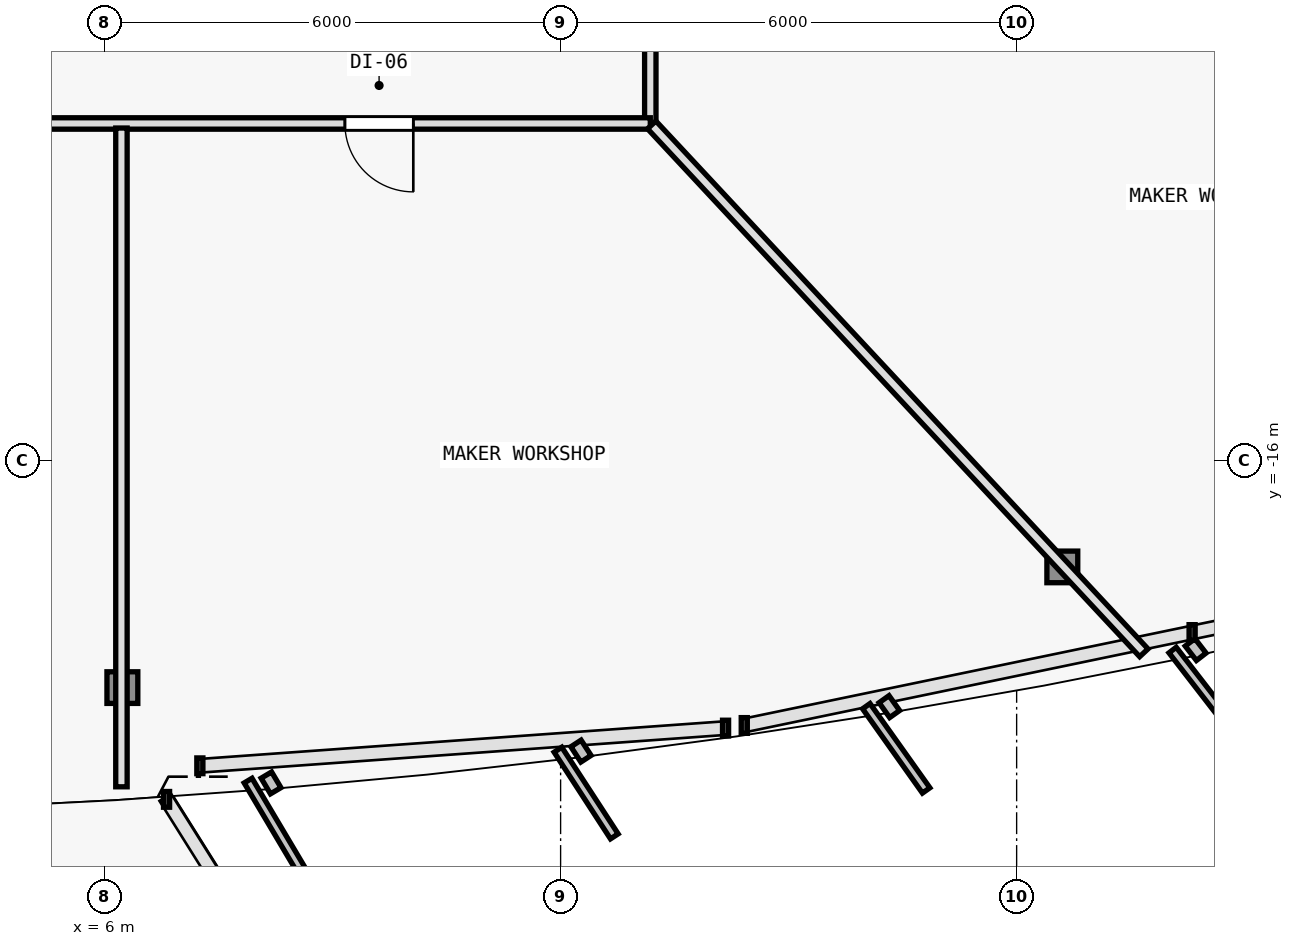
"""IFC4 building model, lengths in metres.
Left out: names, types, materials, properties, quantities, classifications, styles, units other than length and angle.
Written with IfcOpenShell. Run it as: python <this file> out.ifc"""

import sys

from ifc_helpers import new_model, si_unit, direction, frame, frame_2d, origin, origin_2d, place, context, subcontext, project, spatial, rectangle, i_section, extrude, element, fill, save


model = new_model("IFC4")
c1 = context("Model", 3, precision=1e-05, world=origin(), true_north=direction((0.0, 1.0)))
c2 = subcontext(c1, "Body", "Model", "MODEL_VIEW")
j1 = project(units=[si_unit("LENGTHUNIT", "METRE"), si_unit("PLANEANGLEUNIT", "RADIAN")], contexts=[c1])
p1 = place(None, origin())
s1 = spatial("IfcSite", under=j1, at=p1, CompositionType="ELEMENT")
p2 = place(p1, origin())
s2 = spatial("IfcBuilding", under=s1, at=p2, CompositionType="ELEMENT")
p3 = place(p2, frame((0.0, 0.0, 114.9)))
s3 = spatial("IfcBuildingStorey", under=s2, at=p3, CompositionType="ELEMENT", Elevation=114.9)
p4 = place(p3, frame((6.234, -18.982, 0.006), z_axis=(-0.006866308162, 0.0352833063, 0.999353762243), x_axis=(-0.981585848295, -0.191021523464, 0.0)))
e1 = element("IfcColumn", 1, at=p4, inside=s3, PredefinedType="COLUMN", context=c2, shape_type="SweptSolid", body=[
    extrude(i_section(OverallWidth=0.406, OverallDepth=0.416, WebThickness=0.019, FlangeThickness=0.031, FilletRadius=0.015, at=origin_2d()), origin(), (0.0, 0.0, 1.0), 3.591),
])
p5 = place(p3, frame((18.601, -17.394, 0.006), z_axis=(-0.020596339702, 0.033443561496, 0.99922836178), x_axis=(-0.851480003019, -0.52438707503, 0.0)))
e2 = element("IfcColumn", 2, at=p5, inside=s3, PredefinedType="COLUMN", context=c2, shape_type="SweptSolid", body=[
    extrude(i_section(OverallWidth=0.406, OverallDepth=0.416, WebThickness=0.019, FlangeThickness=0.031, FilletRadius=0.015, at=origin_2d()), origin(), (0.0, 0.0, 1.0), 3.592),
])
p6 = place(p3, frame((13.18, 8.444, 0.0), z_axis=(0.0, 0.0, 1.0), x_axis=(0.0, -1.0, 0.0)))
e3 = element("IfcWall", 3, at=p6, inside=s3, PredefinedType="PARTITIONING", context=c2, shape_type="SweptSolid", body=[
    extrude(rectangle(XDim=20.004, YDim=0.15, at=frame_2d((10.002, 0.0))), origin(), (0.0, 0.0, 1.0), 2.705),
])
p7 = place(p6, frame((17.591, 0.0, 0.0)))
e4 = element("IfcOpeningElement", 4, at=p7, cuts=e3, PredefinedType="OPENING", context=c2, shape_type="SweptSolid", body=[
    extrude(rectangle(XDim=0.9, YDim=2.1, at=frame_2d((0.45, 1.05))), frame((0.0, 0.085, 0.0), z_axis=(0.0, -1.0, 0.0), x_axis=(1.0, 0.0, 0.0)), (0.0, 0.0, 1.0), 0.17),
])
p8 = place(p6, frame((13.85, 0.0, 0.0)))
e5 = element("IfcOpeningElement", 5, at=p8, cuts=e3, PredefinedType="OPENING", context=c2, shape_type="SweptSolid", body=[
    extrude(rectangle(XDim=0.9, YDim=2.1, at=frame_2d((0.45, 1.05))), frame((0.0, 0.085, 0.0), z_axis=(0.0, -1.0, 0.0), x_axis=(1.0, 0.0, 0.0)), (0.0, 0.0, 1.0), 0.17),
])
p9 = place(p6, frame((8.422, 0.0, 0.0)))
e6 = element("IfcOpeningElement", 6, at=p9, cuts=e3, PredefinedType="OPENING", context=c2, shape_type="SweptSolid", body=[
    extrude(rectangle(XDim=0.9, YDim=2.1, at=frame_2d((0.45, 1.05))), frame((0.0, 0.085, 0.0), z_axis=(0.0, -1.0, 0.0), x_axis=(1.0, 0.0, 0.0)), (0.0, 0.0, 1.0), 0.17),
])
p10 = place(p6, frame((3.625, 0.0, 0.0)))
e7 = element("IfcOpeningElement", 7, at=p10, cuts=e3, PredefinedType="OPENING", context=c2, shape_type="SweptSolid", body=[
    extrude(rectangle(XDim=0.9, YDim=2.1, at=frame_2d((0.45, 1.05))), frame((0.0, 0.085, 0.0), z_axis=(0.0, -1.0, 0.0), x_axis=(1.0, 0.0, 0.0)), (0.0, 0.0, 1.0), 0.17),
])
p11 = place(p6, frame((1.014, 0.0, 0.0)))
e8 = element("IfcOpeningElement", 8, at=p11, cuts=e3, PredefinedType="OPENING", context=c2, shape_type="SweptSolid", body=[
    extrude(rectangle(XDim=0.9, YDim=2.1, at=frame_2d((0.45, 1.05))), frame((0.0, 0.085, 0.0), z_axis=(0.0, -1.0, 0.0), x_axis=(1.0, 0.0, 0.0)), (0.0, 0.0, 1.0), 0.17),
])
p12 = place(p3, frame((13.18, -11.56, 0.0), z_axis=(0.0, 0.0, 1.0), x_axis=(-1.0, 0.0, 0.0)))
e9 = element("IfcWall", 9, at=p12, inside=s3, PredefinedType="PARTITIONING", context=c2, shape_type="SweptSolid", body=[
    extrude(rectangle(XDim=23.04, YDim=0.15, at=frame_2d((11.52, 0.0))), origin(), (0.0, 0.0, 1.0), 2.775),
])
p13 = place(p12, frame((20.682, 0.0, 0.0)))
e10 = element("IfcOpeningElement", 10, at=p13, cuts=e9, PredefinedType="OPENING", context=c2, shape_type="SweptSolid", body=[
    extrude(rectangle(XDim=0.9, YDim=2.1, at=frame_2d((0.45, 1.05))), frame((0.0, 0.085, 0.0), z_axis=(0.0, -1.0, 0.0), x_axis=(1.0, 0.0, 0.0)), (0.0, 0.0, 1.0), 0.17),
])
p14 = place(p12, frame((12.73, 0.0, 0.0)))
e11 = element("IfcOpeningElement", 11, at=p14, cuts=e9, PredefinedType="OPENING", context=c2, shape_type="SweptSolid", body=[
    extrude(rectangle(XDim=0.9, YDim=2.1, at=frame_2d((0.45, 1.05))), frame((0.0, 0.085, 0.0), z_axis=(0.0, -1.0, 0.0), x_axis=(1.0, 0.0, 0.0)), (0.0, 0.0, 1.0), 0.17),
])
p15 = place(p12, frame((3.118, 0.0, 0.0)))
e12 = element("IfcOpeningElement", 12, at=p15, cuts=e9, PredefinedType="OPENING", context=c2, shape_type="SweptSolid", body=[
    extrude(rectangle(XDim=0.9, YDim=2.1, at=frame_2d((0.45, 1.05))), frame((0.0, 0.085, 0.0), z_axis=(0.0, -1.0, 0.0), x_axis=(1.0, 0.0, 0.0)), (0.0, 0.0, 1.0), 0.17),
])
p16 = place(p3, frame((6.222, -11.62, 0.0), z_axis=(0.0, 0.0, 1.0), x_axis=(0.0, -1.0, 0.0)))
e13 = element("IfcWall", 13, at=p16, inside=s3, PredefinedType="PARTITIONING", context=c2, shape_type="SweptSolid", body=[
    extrude(rectangle(XDim=8.667, YDim=0.15, at=frame_2d((4.333, 0.0))), origin(), (0.0, 0.0, 1.0), 2.775),
])
p17 = place(p3, frame((13.199, -11.579, 0.0), z_axis=(0.0, 0.0, 1.0), x_axis=(0.68192513302, -0.731421980087, 0.0)))
e14 = element("IfcWall", 14, at=p17, inside=s3, PredefinedType="PARTITIONING", context=c2, shape_type="SweptSolid", body=[
    extrude(rectangle(XDim=9.495, YDim=0.15, at=frame_2d((4.748, 0.0))), origin(), (0.0, 0.0, 1.0), 2.775),
])
p18 = place(p15, origin())
e15 = element("IfcDoor", 15, at=p18, inside=s3, OperationType="SINGLE_SWING_LEFT", PredefinedType="DOOR", context=c2, shape_type="SweptSolid", body=[
    extrude(rectangle(XDim=0.9, YDim=2.1, at=frame_2d((0.45, 1.05))), frame((0.0, 0.025, 0.0), z_axis=(0.0, -1.0, 0.0), x_axis=(1.0, 0.0, 0.0)), (0.0, 0.0, 1.0), 0.05),
])
fill(e12, e15)
save(model, sys.argv[1])
